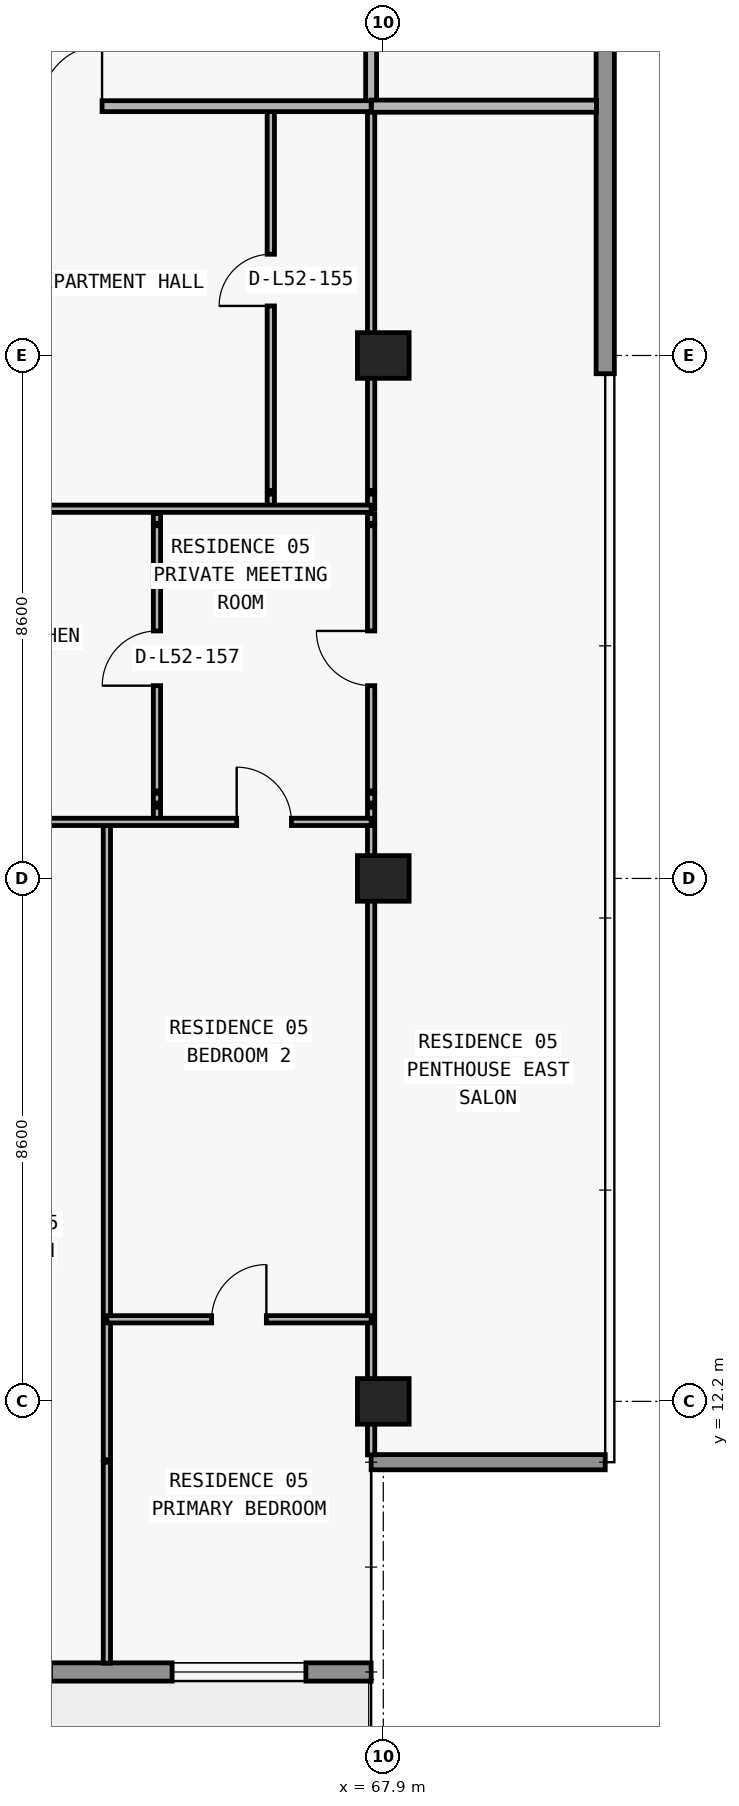
"""IFC4 building model, lengths in metres.
Left out: names, types, materials, properties, quantities, classifications, styles, units other than length and angle.
Written with IfcOpenShell. Run it as: python <this file> out.ifc"""

import sys

from ifc_helpers import new_model, si_unit, direction, frame, frame_2d, origin, origin_2d, place, context, subcontext, project, spatial, rectangle, extrude, element, fill, save


model = new_model("IFC4")
c1 = context("Model", 3, precision=1e-05, world=origin(), true_north=direction((0.0, 1.0)))
c2 = subcontext(c1, "Body", "Model", "MODEL_VIEW")
j1 = project(units=[si_unit("LENGTHUNIT", "METRE"), si_unit("PLANEANGLEUNIT", "RADIAN")], contexts=[c1])
p1 = place(None, origin())
s1 = spatial("IfcSite", under=j1, at=p1, CompositionType="ELEMENT")
p2 = place(p1, origin())
s2 = spatial("IfcBuilding", under=s1, at=p2, CompositionType="ELEMENT")
p3 = place(p2, frame((0.0, 0.0, 188.4)))
s3 = spatial("IfcBuildingStorey", under=s2, at=p3, CompositionType="ELEMENT", Elevation=188.4)
for number, where, z_axis, x_axis in (
    (1, (67.9, 12.2, 0.0), (0.0, 0.0, 1.0), (1.0, 0.0, 0.0)),
    (2, (67.9, 20.8, 0.0), (0.0, 0.0, 1.0), (1.0, 0.0, 0.0)),
    (3, (67.9, 29.4, 0.0), (0.0, 0.0, 1.0), (1.0, 0.0, 0.0)),
):
    element("IfcColumn", number, at=place(p3, frame(where, z_axis=z_axis, x_axis=x_axis)), inside=s3, PredefinedType="COLUMN", context=c2, shape_type="SweptSolid", body=[
        extrude(rectangle(XDim=0.85, YDim=0.75, at=origin_2d()), origin(), (0.0, 0.0, 1.0), 3.05),
    ])
p4 = place(p3, frame((67.7, 7.75, 0.0), z_axis=(0.0, 0.0, 1.0), x_axis=(-1.0, 0.0, 0.0)))
e4 = element("IfcWall", 4, at=p4, inside=s3, PredefinedType="STANDARD", context=c2, shape_type="SweptSolid", body=[
    extrude(rectangle(XDim=57.6, YDim=0.3, at=frame_2d((28.8, 0.0))), origin(), (0.0, 0.0, 1.0), 3.05),
])
p5 = place(p4, frame((54.69, 0.0, 0.0)))
e5 = element("IfcOpeningElement", 5, at=p5, cuts=e4, PredefinedType="OPENING", context=c2, shape_type="SweptSolid", body=[
    extrude(rectangle(XDim=2.0, YDim=2.3, at=frame_2d((1.0, 1.15))), frame((0.0, 0.16, 0.0), z_axis=(0.0, -1.0, 0.0), x_axis=(1.0, 0.0, 0.0)), (0.0, 0.0, 1.0), 0.32),
])
p6 = place(p4, frame((50.21, 0.0, 0.65)))
e6 = element("IfcOpeningElement", 6, at=p6, cuts=e4, PredefinedType="OPENING", context=c2, shape_type="SweptSolid", body=[
    extrude(rectangle(XDim=2.6, YDim=1.85, at=frame_2d((1.3, 0.925))), frame((0.0, 0.16, 0.0), z_axis=(0.0, -1.0, 0.0), x_axis=(1.0, 0.0, 0.0)), (0.0, 0.0, 1.0), 0.32),
])
p7 = place(p4, frame((44.1, 0.0, 0.85)))
e7 = element("IfcOpeningElement", 7, at=p7, cuts=e4, PredefinedType="OPENING", context=c2, shape_type="SweptSolid", body=[
    extrude(rectangle(XDim=2.2, YDim=1.55, at=frame_2d((1.1, 0.775))), frame((0.0, 0.16, 0.0), z_axis=(0.0, -1.0, 0.0), x_axis=(1.0, 0.0, 0.0)), (0.0, 0.0, 1.0), 0.32),
])
p8 = place(p4, frame((37.69, 0.0, 0.0)))
e8 = element("IfcOpeningElement", 8, at=p8, cuts=e4, PredefinedType="OPENING", context=c2, shape_type="SweptSolid", body=[
    extrude(rectangle(XDim=2.0, YDim=2.3, at=frame_2d((1.0, 1.15))), frame((0.0, 0.16, 0.0), z_axis=(0.0, -1.0, 0.0), x_axis=(1.0, 0.0, 0.0)), (0.0, 0.0, 1.0), 0.32),
])
p9 = place(p4, frame((33.59, 0.0, 0.85)))
e9 = element("IfcOpeningElement", 9, at=p9, cuts=e4, PredefinedType="OPENING", context=c2, shape_type="SweptSolid", body=[
    extrude(rectangle(XDim=1.8, YDim=1.55, at=frame_2d((0.9, 0.775))), frame((0.0, 0.16, 0.0), z_axis=(0.0, -1.0, 0.0), x_axis=(1.0, 0.0, 0.0)), (0.0, 0.0, 1.0), 0.32),
])
p10 = place(p4, frame((29.69, 0.0, 0.0)))
e10 = element("IfcOpeningElement", 10, at=p10, cuts=e4, PredefinedType="OPENING", context=c2, shape_type="SweptSolid", body=[
    extrude(rectangle(XDim=2.0, YDim=2.3, at=frame_2d((1.0, 1.15))), frame((0.0, 0.16, 0.0), z_axis=(0.0, -1.0, 0.0), x_axis=(1.0, 0.0, 0.0)), (0.0, 0.0, 1.0), 0.32),
])
p11 = place(p4, frame((25.81, 0.0, 0.65)))
e11 = element("IfcOpeningElement", 11, at=p11, cuts=e4, PredefinedType="OPENING", context=c2, shape_type="SweptSolid", body=[
    extrude(rectangle(XDim=2.6, YDim=1.85, at=frame_2d((1.3, 0.925))), frame((0.0, 0.16, 0.0), z_axis=(0.0, -1.0, 0.0), x_axis=(1.0, 0.0, 0.0)), (0.0, 0.0, 1.0), 0.32),
])
p12 = place(p4, frame((19.7, 0.0, 0.85)))
e12 = element("IfcOpeningElement", 12, at=p12, cuts=e4, PredefinedType="OPENING", context=c2, shape_type="SweptSolid", body=[
    extrude(rectangle(XDim=2.2, YDim=1.55, at=frame_2d((1.1, 0.775))), frame((0.0, 0.16, 0.0), z_axis=(0.0, -1.0, 0.0), x_axis=(1.0, 0.0, 0.0)), (0.0, 0.0, 1.0), 0.32),
])
p13 = place(p4, frame((13.29, 0.0, 0.0)))
e13 = element("IfcOpeningElement", 13, at=p13, cuts=e4, PredefinedType="OPENING", context=c2, shape_type="SweptSolid", body=[
    extrude(rectangle(XDim=2.0, YDim=2.3, at=frame_2d((1.0, 1.15))), frame((0.0, 0.16, 0.0), z_axis=(0.0, -1.0, 0.0), x_axis=(1.0, 0.0, 0.0)), (0.0, 0.0, 1.0), 0.32),
])
p14 = place(p4, frame((9.19, 0.0, 0.85)))
e14 = element("IfcOpeningElement", 14, at=p14, cuts=e4, PredefinedType="OPENING", context=c2, shape_type="SweptSolid", body=[
    extrude(rectangle(XDim=1.8, YDim=1.55, at=frame_2d((0.9, 0.775))), frame((0.0, 0.16, 0.0), z_axis=(0.0, -1.0, 0.0), x_axis=(1.0, 0.0, 0.0)), (0.0, 0.0, 1.0), 0.32),
])
p15 = place(p4, frame((5.273, 0.0, 0.0)))
e15 = element("IfcOpeningElement", 15, at=p15, cuts=e4, PredefinedType="OPENING", context=c2, shape_type="SweptSolid", body=[
    extrude(rectangle(XDim=2.0, YDim=2.3, at=frame_2d((1.0, 1.15))), frame((0.0, 0.16, 0.0), z_axis=(0.0, -1.0, 0.0), x_axis=(1.0, 0.0, 0.0)), (0.0, 0.0, 1.0), 0.32),
])
p16 = place(p4, frame((1.073, 0.0, 0.85)))
e16 = element("IfcOpeningElement", 16, at=p16, cuts=e4, PredefinedType="OPENING", context=c2, shape_type="SweptSolid", body=[
    extrude(rectangle(XDim=2.2, YDim=1.55, at=frame_2d((1.1, 0.775))), frame((0.0, 0.16, 0.0), z_axis=(0.0, -1.0, 0.0), x_axis=(1.0, 0.0, 0.0)), (0.0, 0.0, 1.0), 0.32),
])
p17 = place(p3, frame((67.7, 11.2, 0.0), z_axis=(0.0, 0.0, 1.0), x_axis=(1.0, 0.0, 0.0)))
e17 = element("IfcWall", 17, at=p17, inside=s3, PredefinedType="ELEMENTEDWALL", context=c2, shape_type="SweptSolid", body=[
    extrude(rectangle(XDim=3.85, YDim=0.25, at=frame_2d((1.925, 0.0))), origin(), (0.0, 0.0, 1.0), 3.05),
])
p18 = place(p3, frame((71.55, 47.0, 0.0), z_axis=(0.0, 0.0, 1.0), x_axis=(0.0, -1.0, 0.0)))
e18 = element("IfcWall", 18, at=p18, inside=s3, PredefinedType="STANDARD", context=c2, shape_type="SweptSolid", body=[
    extrude(rectangle(XDim=17.9, YDim=0.3, at=frame_2d((8.95, 0.0))), origin(), (0.0, 0.0, 1.0), 3.05),
])
p19 = place(p3, frame((63.354, 7.895, 0.0), z_axis=(0.0, 0.0, 1.0), x_axis=(0.0, 1.0, 0.0)))
e19 = element("IfcWall", 19, at=p19, inside=s3, PredefinedType="PARTITIONING", context=c2, shape_type="SweptSolid", body=[
    extrude(rectangle(XDim=3.305, YDim=0.12, at=frame_2d((1.652, 0.0))), origin(), (0.0, 0.0, 1.0), 3.05),
])
p20 = place(p3, frame((63.354, 11.24, 0.0), z_axis=(0.0, 0.0, 1.0), x_axis=(0.0, 1.0, 0.0)))
e20 = element("IfcWall", 20, at=p20, inside=s3, PredefinedType="PARTITIONING", context=c2, shape_type="SweptSolid", body=[
    extrude(rectangle(XDim=10.49, YDim=0.12, at=frame_2d((5.245, 0.0))), origin(), (0.0, 0.0, 1.0), 3.05),
])
p21 = place(p3, frame((64.178, 21.73, 0.0), z_axis=(0.0, 0.0, 1.0), x_axis=(0.0, 1.0, 0.0)))
e21 = element("IfcWall", 21, at=p21, inside=s3, PredefinedType="PARTITIONING", context=c2, shape_type="SweptSolid", body=[
    extrude(rectangle(XDim=0.24, YDim=0.12, at=frame_2d((0.12, 0.0))), origin(), (0.0, 0.0, 1.0), 3.05),
])
p22 = place(p3, frame((64.178, 22.04, 0.0), z_axis=(0.0, 0.0, 1.0), x_axis=(0.0, 1.0, 0.0)))
e22 = element("IfcWall", 22, at=p22, inside=s3, PredefinedType="PARTITIONING", context=c2, shape_type="SweptSolid", body=[
    extrude(rectangle(XDim=0.16, YDim=0.12, at=frame_2d((0.08, 0.0))), origin(), (0.0, 0.0, 1.0), 3.05),
])
p23 = place(p3, frame((64.178, 22.24, 0.0), z_axis=(0.0, 0.0, 1.0), x_axis=(0.0, 1.0, 0.0)))
e23 = element("IfcWall", 23, at=p23, inside=s3, PredefinedType="PARTITIONING", context=c2, shape_type="SweptSolid", body=[
    extrude(rectangle(XDim=4.36, YDim=0.12, at=frame_2d((2.18, 0.0))), origin(), (0.0, 0.0, 1.0), 3.05),
])
p24 = place(p23, frame((1.73, 0.0, 0.0)))
e24 = element("IfcOpeningElement", 24, at=p24, cuts=e23, PredefinedType="OPENING", context=c2, shape_type="SweptSolid", body=[
    extrude(rectangle(XDim=0.9, YDim=2.15, at=frame_2d((0.45, 1.075))), frame((0.0, 0.07, 0.0), z_axis=(0.0, -1.0, 0.0), x_axis=(1.0, 0.0, 0.0)), (0.0, 0.0, 1.0), 0.14),
])
p25 = place(p3, frame((64.178, 26.64, 0.0), z_axis=(0.0, 0.0, 1.0), x_axis=(0.0, 1.0, 0.0)))
e25 = element("IfcWall", 25, at=p25, inside=s3, PredefinedType="PARTITIONING", context=c2, shape_type="SweptSolid", body=[
    extrude(rectangle(XDim=0.16, YDim=0.12, at=frame_2d((0.08, 0.0))), origin(), (0.0, 0.0, 1.0), 3.05),
])
p26 = place(p3, frame((66.05, 26.88, 0.0), z_axis=(0.0, 0.0, 1.0), x_axis=(0.0, 1.0, 0.0)))
e26 = element("IfcWall", 26, at=p26, inside=s3, PredefinedType="PARTITIONING", context=c2, shape_type="SweptSolid", body=[
    extrude(rectangle(XDim=0.24, YDim=0.12, at=frame_2d((0.12, 0.0))), origin(), (0.0, 0.0, 1.0), 3.05),
])
p27 = place(p3, frame((66.05, 27.18, 0.0), z_axis=(0.0, 0.0, 1.0), x_axis=(0.0, 1.0, 0.0)))
e27 = element("IfcWall", 27, at=p27, inside=s3, PredefinedType="PARTITIONING", context=c2, shape_type="SweptSolid", body=[
    extrude(rectangle(XDim=6.32, YDim=0.12, at=frame_2d((3.16, 0.0))), origin(), (0.0, 0.0, 1.0), 3.05),
])
p28 = place(p27, frame((3.035, 0.0, 0.0)))
e28 = element("IfcOpeningElement", 28, at=p28, cuts=e27, PredefinedType="OPENING", context=c2, shape_type="SweptSolid", body=[
    extrude(rectangle(XDim=0.85, YDim=2.1, at=frame_2d((0.425, 1.05))), frame((0.0, 0.07, 0.0), z_axis=(0.0, -1.0, 0.0), x_axis=(1.0, 0.0, 0.0)), (0.0, 0.0, 1.0), 0.14),
])
p29 = place(p3, frame((67.7, 11.32, 0.0), z_axis=(0.0, 0.0, 1.0), x_axis=(0.0, 1.0, 0.0)))
e29 = element("IfcWall", 29, at=p29, inside=s3, PredefinedType="PARTITIONING", context=c2, shape_type="SweptSolid", body=[
    extrude(rectangle(XDim=10.65, YDim=0.12, at=frame_2d((5.325, 0.0))), origin(), (0.0, 0.0, 1.0), 2.263),
])
p30 = place(p3, frame((67.7, 22.04, 0.0), z_axis=(0.0, 0.0, 1.0), x_axis=(0.0, 1.0, 0.0)))
e30 = element("IfcWall", 30, at=p30, inside=s3, PredefinedType="PARTITIONING", context=c2, shape_type="SweptSolid", body=[
    extrude(rectangle(XDim=0.16, YDim=0.12, at=frame_2d((0.08, 0.0))), origin(), (0.0, 0.0, 1.0), 2.263),
])
p31 = place(p3, frame((67.7, 22.24, 0.0), z_axis=(0.0, 0.0, 1.0), x_axis=(0.0, 1.0, 0.0)))
e31 = element("IfcWall", 31, at=p31, inside=s3, PredefinedType="PARTITIONING", context=c2, shape_type="SweptSolid", body=[
    extrude(rectangle(XDim=4.36, YDim=0.12, at=frame_2d((2.18, 0.0))), origin(), (0.0, 0.0, 1.0), 2.263),
])
p32 = place(p31, frame((1.73, 0.0, 0.0)))
e32 = element("IfcOpeningElement", 32, at=p32, cuts=e31, PredefinedType="OPENING", context=c2, shape_type="SweptSolid", body=[
    extrude(rectangle(XDim=0.9, YDim=2.15, at=frame_2d((0.45, 1.075))), frame((0.0, 0.07, 0.0), z_axis=(0.0, -1.0, 0.0), x_axis=(1.0, 0.0, 0.0)), (0.0, 0.0, 1.0), 0.14),
])
p33 = place(p3, frame((67.7, 26.64, 0.0), z_axis=(0.0, 0.0, 1.0), x_axis=(0.0, 1.0, 0.0)))
e33 = element("IfcWall", 33, at=p33, inside=s3, PredefinedType="PARTITIONING", context=c2, shape_type="SweptSolid", body=[
    extrude(rectangle(XDim=0.16, YDim=0.12, at=frame_2d((0.08, 0.0))), origin(), (0.0, 0.0, 1.0), 2.263),
])
p34 = place(p3, frame((67.7, 26.88, 0.0), z_axis=(0.0, 0.0, 1.0), x_axis=(0.0, 1.0, 0.0)))
e34 = element("IfcWall", 34, at=p34, inside=s3, PredefinedType="PARTITIONING", context=c2, shape_type="SweptSolid", body=[
    extrude(rectangle(XDim=0.24, YDim=0.12, at=frame_2d((0.12, 0.0))), origin(), (0.0, 0.0, 1.0), 2.263),
])
p35 = place(p3, frame((67.7, 27.18, 0.0), z_axis=(0.0, 0.0, 1.0), x_axis=(0.0, 1.0, 0.0)))
e35 = element("IfcWall", 35, at=p35, inside=s3, PredefinedType="PARTITIONING", context=c2, shape_type="SweptSolid", body=[
    extrude(rectangle(XDim=6.32, YDim=0.12, at=frame_2d((3.16, 0.0))), origin(), (0.0, 0.0, 1.0), 2.263),
])
p36 = place(p3, frame((67.7, 33.505, 0.0), z_axis=(0.0, 0.0, 1.0), x_axis=(0.0, 1.0, 0.0)))
e36 = element("IfcWall", 36, at=p36, inside=s3, PredefinedType="PARTITIONING", context=c2, shape_type="SweptSolid", body=[
    extrude(rectangle(XDim=3.495, YDim=0.18, at=frame_2d((1.748, 0.0))), origin(), (0.0, 0.0, 1.0), 2.263),
])
p37 = place(p3, frame((63.354, 13.55, 0.0), z_axis=(0.0, 0.0, 1.0), x_axis=(1.0, 0.0, 0.0)))
e37 = element("IfcWall", 37, at=p37, inside=s3, PredefinedType="PARTITIONING", context=c2, shape_type="SweptSolid", body=[
    extrude(rectangle(XDim=4.346, YDim=0.12, at=frame_2d((2.173, 0.0))), origin(), (0.0, 0.0, 1.0), 3.05),
])
p38 = place(p37, frame((1.723, 0.0, 0.0)))
e38 = element("IfcOpeningElement", 38, at=p38, cuts=e37, PredefinedType="OPENING", context=c2, shape_type="SweptSolid", body=[
    extrude(rectangle(XDim=0.9, YDim=2.15, at=frame_2d((0.45, 1.075))), frame((0.0, 0.07, 0.0), z_axis=(0.0, -1.0, 0.0), x_axis=(1.0, 0.0, 0.0)), (0.0, 0.0, 1.0), 0.14),
])
p39 = place(p3, frame((59.5, 21.73, 0.0), z_axis=(0.0, 0.0, 1.0), x_axis=(1.0, 0.0, 0.0)))
e39 = element("IfcWall", 39, at=p39, inside=s3, PredefinedType="PARTITIONING", context=c2, shape_type="SweptSolid", body=[
    extrude(rectangle(XDim=8.2, YDim=0.12, at=frame_2d((4.1, 0.0))), origin(), (0.0, 0.0, 1.0), 3.05),
])
p40 = place(p39, frame((1.477, 0.0, 0.0)))
e40 = element("IfcOpeningElement", 40, at=p40, cuts=e39, PredefinedType="OPENING", context=c2, shape_type="SweptSolid", body=[
    extrude(rectangle(XDim=0.9, YDim=2.15, at=frame_2d((0.45, 1.075))), frame((0.0, 0.07, 0.0), z_axis=(0.0, -1.0, 0.0), x_axis=(1.0, 0.0, 0.0)), (0.0, 0.0, 1.0), 0.14),
])
p41 = place(p39, frame((5.989, 0.0, 0.0)))
e41 = element("IfcOpeningElement", 41, at=p41, cuts=e39, PredefinedType="OPENING", context=c2, shape_type="SweptSolid", body=[
    extrude(rectangle(XDim=0.9, YDim=2.15, at=frame_2d((0.45, 1.075))), frame((0.0, 0.07, 0.0), z_axis=(0.0, -1.0, 0.0), x_axis=(1.0, 0.0, 0.0)), (0.0, 0.0, 1.0), 0.14),
])
p42 = place(p3, frame((59.5, 26.88, 0.0), z_axis=(0.0, 0.0, 1.0), x_axis=(1.0, 0.0, 0.0)))
e42 = element("IfcWall", 42, at=p42, inside=s3, PredefinedType="PARTITIONING", context=c2, shape_type="SweptSolid", body=[
    extrude(rectangle(XDim=8.2, YDim=0.12, at=frame_2d((4.1, 0.0))), origin(), (0.0, 0.0, 1.0), 3.05),
])
p43 = place(p42, frame((1.889, 0.0, 0.0)))
e43 = element("IfcOpeningElement", 43, at=p43, cuts=e42, PredefinedType="OPENING", context=c2, shape_type="SweptSolid", body=[
    extrude(rectangle(XDim=0.9, YDim=2.15, at=frame_2d((0.45, 1.075))), frame((0.0, 0.07, 0.0), z_axis=(0.0, -1.0, 0.0), x_axis=(1.0, 0.0, 0.0)), (0.0, 0.0, 1.0), 0.14),
])
p44 = place(p3, frame((31.4, 33.5, 0.0), z_axis=(0.0, 0.0, 1.0), x_axis=(1.0, 0.0, 0.0)))
e44 = element("IfcWall", 44, at=p44, inside=s3, PredefinedType="PARTITIONING", context=c2, shape_type="SweptSolid", body=[
    extrude(rectangle(XDim=36.3, YDim=0.18, at=frame_2d((18.15, 0.0))), origin(), (0.0, 0.0, 1.0), 3.05),
])
p45 = place(p44, frame((6.231, 0.0, 0.0)))
e45 = element("IfcOpeningElement", 45, at=p45, cuts=e44, PredefinedType="OPENING", context=c2, shape_type="SweptSolid", body=[
    extrude(rectangle(XDim=1.0, YDim=2.2, at=frame_2d((0.5, 1.1))), frame((0.0, 0.1, 0.0), z_axis=(0.0, -1.0, 0.0), x_axis=(1.0, 0.0, 0.0)), (0.0, 0.0, 1.0), 0.2),
])
p46 = place(p44, frame((22.575, 0.0, 0.0)))
e46 = element("IfcOpeningElement", 46, at=p46, cuts=e44, PredefinedType="OPENING", context=c2, shape_type="SweptSolid", body=[
    extrude(rectangle(XDim=1.0, YDim=2.2, at=frame_2d((0.5, 1.1))), frame((0.0, 0.1, 0.0), z_axis=(0.0, -1.0, 0.0), x_axis=(1.0, 0.0, 0.0)), (0.0, 0.0, 1.0), 0.2),
])
p47 = place(p44, frame((30.875, 0.0, 0.0)))
e47 = element("IfcOpeningElement", 47, at=p47, cuts=e44, PredefinedType="OPENING", context=c2, shape_type="SweptSolid", body=[
    extrude(rectangle(XDim=1.0, YDim=2.2, at=frame_2d((0.5, 1.1))), frame((0.0, 0.1, 0.0), z_axis=(0.0, -1.0, 0.0), x_axis=(1.0, 0.0, 0.0)), (0.0, 0.0, 1.0), 0.2),
])
p48 = place(p3, frame((67.705, 33.5, 0.0), z_axis=(0.0, 0.0, 1.0), x_axis=(1.0, 0.0, 0.0)))
e48 = element("IfcWall", 48, at=p48, inside=s3, PredefinedType="PARTITIONING", context=c2, shape_type="SweptSolid", body=[
    extrude(rectangle(XDim=3.7, YDim=0.2, at=frame_2d((1.85, 0.0))), origin(), (0.0, 0.0, 1.0), 3.05),
])
p49 = place(p16, origin())
e49 = element("IfcWindow", 49, at=p49, inside=s3, PartitioningType="SINGLE_PANEL", PredefinedType="WINDOW", context=c2, shape_type="SweptSolid", body=[
    extrude(rectangle(XDim=2.2, YDim=1.55, at=frame_2d((1.1, 0.775))), frame((0.0, 0.03, 0.0), z_axis=(0.0, -1.0, 0.0), x_axis=(1.0, 0.0, 0.0)), (0.0, 0.0, 1.0), 0.06),
])
fill(e16, e49)
p50 = place(p47, origin())
e50 = element("IfcDoor", 50, at=p50, inside=s3, OperationType="SINGLE_SWING_RIGHT", PredefinedType="DOOR", context=c2, shape_type="SweptSolid", body=[
    extrude(rectangle(XDim=1.0, YDim=2.2, at=frame_2d((0.5, 1.1))), frame((0.0, 0.025, 0.0), z_axis=(0.0, -1.0, 0.0), x_axis=(1.0, 0.0, 0.0)), (0.0, 0.0, 1.0), 0.05),
])
fill(e47, e50)
p51 = place(p28, origin())
e51 = element("IfcDoor", 51, at=p51, inside=s3, OperationType="SINGLE_SWING_LEFT", PredefinedType="DOOR", context=c2, shape_type="SweptSolid", body=[
    extrude(rectangle(XDim=0.85, YDim=2.1, at=frame_2d((0.425, 1.05))), frame((0.0, 0.025, 0.0), z_axis=(0.0, -1.0, 0.0), x_axis=(1.0, 0.0, 0.0)), (0.0, 0.0, 1.0), 0.05),
])
fill(e28, e51)
p52 = place(p24, origin())
e52 = element("IfcDoor", 52, at=p52, inside=s3, OperationType="SINGLE_SWING_LEFT", PredefinedType="DOOR", context=c2, shape_type="SweptSolid", body=[
    extrude(rectangle(XDim=0.9, YDim=2.15, at=frame_2d((0.45, 1.075))), frame((0.0, 0.025, 0.0), z_axis=(0.0, -1.0, 0.0), x_axis=(1.0, 0.0, 0.0)), (0.0, 0.0, 1.0), 0.05),
])
fill(e24, e52)
p53 = place(p41, origin())
e53 = element("IfcDoor", 53, at=p53, inside=s3, OperationType="SINGLE_SWING_LEFT", PredefinedType="DOOR", context=c2, shape_type="SweptSolid", body=[
    extrude(rectangle(XDim=0.9, YDim=2.15, at=frame_2d((0.45, 1.075))), frame((0.0, 0.025, 0.0), z_axis=(0.0, -1.0, 0.0), x_axis=(1.0, 0.0, 0.0)), (0.0, 0.0, 1.0), 0.05),
])
fill(e41, e53)
p54 = place(p38, origin())
e54 = element("IfcDoor", 54, at=p54, inside=s3, OperationType="SINGLE_SWING_RIGHT", PredefinedType="DOOR", context=c2, shape_type="SweptSolid", body=[
    extrude(rectangle(XDim=0.9, YDim=2.15, at=frame_2d((0.45, 1.075))), frame((0.0, 0.025, 0.0), z_axis=(0.0, -1.0, 0.0), x_axis=(1.0, 0.0, 0.0)), (0.0, 0.0, 1.0), 0.05),
])
fill(e38, e54)
p55 = place(p32, origin())
e55 = element("IfcDoor", 55, at=p55, inside=s3, OperationType="SINGLE_SWING_RIGHT", PredefinedType="DOOR", context=c2, shape_type="SweptSolid", body=[
    extrude(rectangle(XDim=0.9, YDim=2.15, at=frame_2d((0.45, 1.075))), frame((0.0, 0.025, 0.0), z_axis=(0.0, -1.0, 0.0), x_axis=(1.0, 0.0, 0.0)), (0.0, 0.0, 1.0), 0.05),
])
fill(e32, e55)
save(model, sys.argv[1])
